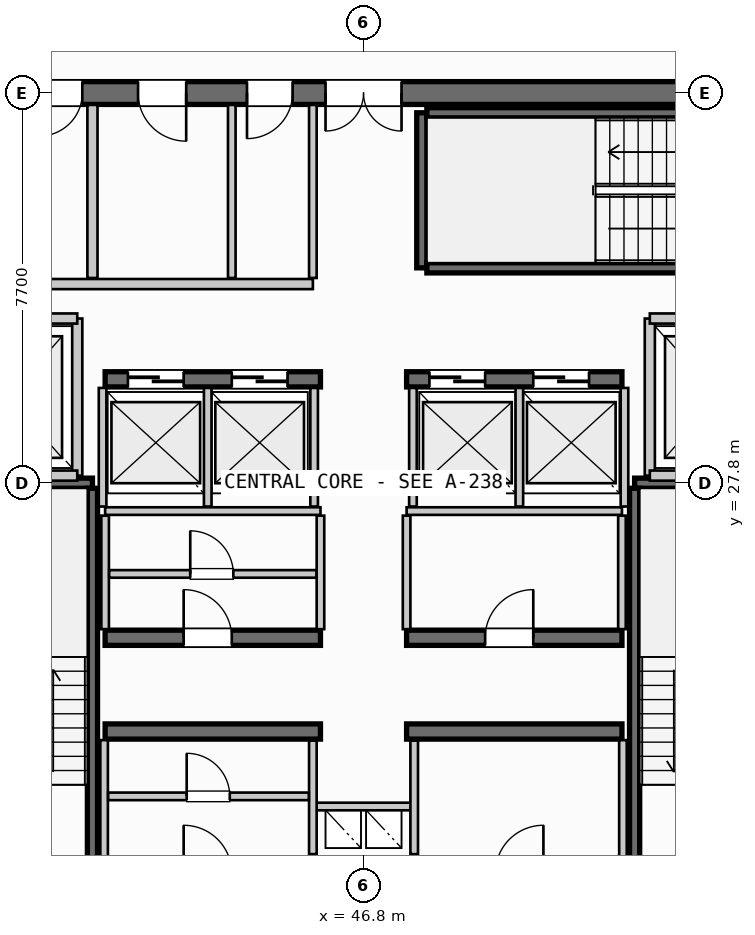
"""IFC4 building model, lengths in metres.
Left out: names, types, materials, properties, quantities, classifications, styles, units other than length and angle.
Written with IfcOpenShell. Run it as: python <this file> out.ifc"""

import sys

from ifc_helpers import new_model, si_unit, direction, frame, frame_2d, origin, place, context, subcontext, project, spatial, rectangle, extrude, source, transform, mapped, element, fill, save


model = new_model("IFC4")
c1 = context("Model", 3, precision=1e-05, world=origin(), true_north=direction((0.0, 1.0)))
c2 = subcontext(c1, "Body", "Model", "MODEL_VIEW")
j1 = project(units=[si_unit("LENGTHUNIT", "METRE"), si_unit("PLANEANGLEUNIT", "RADIAN")], contexts=[c1])
p1 = place(None, origin())
s1 = spatial("IfcSite", under=j1, at=p1, CompositionType="ELEMENT")
p2 = place(p1, origin())
s2 = spatial("IfcBuilding", under=s1, at=p2, CompositionType="ELEMENT")
p3 = place(p2, frame((0.0, 0.0, 276.7)))
s3 = spatial("IfcBuildingStorey", under=s2, at=p3, CompositionType="ELEMENT", Elevation=276.7)
p4 = place(p3, frame((55.6, 35.5, 0.0), z_axis=(0.0, 0.0, 1.0), x_axis=(-1.0, 0.0, 0.0)))
e1 = element("IfcWall", 1, at=p4, inside=s3, PredefinedType="SHEAR", context=c2, shape_type="SweptSolid", body=[
    extrude(rectangle(XDim=17.6, YDim=0.45, at=frame_2d((8.8, 0.0))), origin(), (0.0, 0.0, 1.0), 3.21),
])
p5 = place(p4, frame((8.05, 0.0, 0.0)))
e2 = element("IfcOpeningElement", 2, at=p5, cuts=e1, PredefinedType="OPENING", context=c2, shape_type="SweptSolid", body=[
    extrude(rectangle(XDim=1.5, YDim=2.2, at=frame_2d((0.75, 1.1))), frame((0.0, 0.235, 0.0), z_axis=(0.0, -1.0, 0.0), x_axis=(1.0, 0.0, 0.0)), (0.0, 0.0, 1.0), 0.47),
])
p6 = place(p4, frame((15.85, 0.0, 0.0)))
e3 = element("IfcOpeningElement", 3, at=p6, cuts=e1, PredefinedType="OPENING", context=c2, shape_type="SweptSolid", body=[
    extrude(rectangle(XDim=0.85, YDim=2.15, at=frame_2d((0.425, 1.075))), frame((0.0, 0.235, 0.0), z_axis=(0.0, -1.0, 0.0), x_axis=(1.0, 0.0, 0.0)), (0.0, 0.0, 1.0), 0.47),
])
p7 = place(p4, frame((14.35, 0.0, 0.0)))
e4 = element("IfcOpeningElement", 4, at=p7, cuts=e1, PredefinedType="OPENING", context=c2, shape_type="SweptSolid", body=[
    extrude(rectangle(XDim=0.85, YDim=2.15, at=frame_2d((0.425, 1.075))), frame((0.0, 0.235, 0.0), z_axis=(0.0, -1.0, 0.0), x_axis=(1.0, 0.0, 0.0)), (0.0, 0.0, 1.0), 0.47),
])
p8 = place(p4, frame((12.3, 0.0, 0.0)))
e5 = element("IfcOpeningElement", 5, at=p8, cuts=e1, PredefinedType="OPENING", context=c2, shape_type="SweptSolid", body=[
    extrude(rectangle(XDim=0.95, YDim=2.15, at=frame_2d((0.475, 1.075))), frame((0.0, 0.235, 0.0), z_axis=(0.0, -1.0, 0.0), x_axis=(1.0, 0.0, 0.0)), (0.0, 0.0, 1.0), 0.47),
])
p9 = place(p4, frame((10.2, 0.0, 0.0)))
e6 = element("IfcOpeningElement", 6, at=p9, cuts=e1, PredefinedType="OPENING", context=c2, shape_type="SweptSolid", body=[
    extrude(rectangle(XDim=0.9, YDim=2.15, at=frame_2d((0.45, 1.075))), frame((0.0, 0.235, 0.0), z_axis=(0.0, -1.0, 0.0), x_axis=(1.0, 0.0, 0.0)), (0.0, 0.0, 1.0), 0.47),
])
for number, where, z_axis, x_axis in (
    (7, (41.7, 22.9, 0.0), (0.0, 0.0, 1.0), (1.0, 0.0, 0.0)),
    (8, (47.65, 22.9, 0.0), (0.0, 0.0, 1.0), (1.0, 0.0, 0.0)),
):
    element("IfcWall", number, at=place(p3, frame(where, z_axis=z_axis, x_axis=x_axis)), inside=s3, PredefinedType="SHEAR", context=c2, shape_type="SweptSolid", body=[
        extrude(rectangle(XDim=4.25, YDim=0.3, at=frame_2d((2.125, 0.0))), origin(), (0.0, 0.0, 1.0), 3.21),
    ])
p10 = place(p3, frame((41.7, 24.75, 0.0), z_axis=(0.0, 0.0, 1.0), x_axis=(1.0, 0.0, 0.0)))
e9 = element("IfcWall", 9, at=p10, inside=s3, PredefinedType="SHEAR", context=c2, shape_type="SweptSolid", body=[
    extrude(rectangle(XDim=4.25, YDim=0.3, at=frame_2d((2.125, 0.0))), origin(), (0.0, 0.0, 1.0), 3.21),
])
p11 = place(p10, frame((1.55, 0.0, 0.0)))
e10 = element("IfcOpeningElement", 10, at=p11, cuts=e9, PredefinedType="OPENING", context=c2, shape_type="SweptSolid", body=[
    extrude(rectangle(XDim=0.95, YDim=2.15, at=frame_2d((0.475, 1.075))), frame((0.0, 0.16, 0.0), z_axis=(0.0, -1.0, 0.0), x_axis=(1.0, 0.0, 0.0)), (0.0, 0.0, 1.0), 0.32),
])
p12 = place(p3, frame((47.65, 24.75, 0.0), z_axis=(0.0, 0.0, 1.0), x_axis=(1.0, 0.0, 0.0)))
e11 = element("IfcWall", 11, at=p12, inside=s3, PredefinedType="SHEAR", context=c2, shape_type="SweptSolid", body=[
    extrude(rectangle(XDim=4.25, YDim=0.3, at=frame_2d((2.125, 0.0))), origin(), (0.0, 0.0, 1.0), 3.21),
])
p13 = place(p12, frame((1.55, 0.0, 0.0)))
e12 = element("IfcOpeningElement", 12, at=p13, cuts=e11, PredefinedType="OPENING", context=c2, shape_type="SweptSolid", body=[
    extrude(rectangle(XDim=0.95, YDim=2.15, at=frame_2d((0.475, 1.075))), frame((0.0, 0.16, 0.0), z_axis=(0.0, -1.0, 0.0), x_axis=(1.0, 0.0, 0.0)), (0.0, 0.0, 1.0), 0.32),
])
p14 = place(p3, frame((41.7, 29.85, 0.0), z_axis=(0.0, 0.0, 1.0), x_axis=(1.0, 0.0, 0.0)))
e13 = element("IfcWall", 13, at=p14, inside=s3, PredefinedType="SHEAR", context=c2, shape_type="SweptSolid", body=[
    extrude(rectangle(XDim=4.25, YDim=0.3, at=frame_2d((2.125, 0.0))), origin(), (0.0, 0.0, 1.0), 3.21),
])
p15 = place(p14, frame((0.45, 0.0, 0.0)))
e14 = element("IfcOpeningElement", 14, at=p15, cuts=e13, PredefinedType="OPENING", context=c2, shape_type="SweptSolid", body=[
    extrude(rectangle(XDim=1.1, YDim=2.2, at=frame_2d((0.55, 1.1))), frame((0.0, 0.16, 0.0), z_axis=(0.0, -1.0, 0.0), x_axis=(1.0, 0.0, 0.0)), (0.0, 0.0, 1.0), 0.32),
])
p16 = place(p14, frame((2.5, 0.0, 0.0)))
e15 = element("IfcOpeningElement", 15, at=p16, cuts=e13, PredefinedType="OPENING", context=c2, shape_type="SweptSolid", body=[
    extrude(rectangle(XDim=1.1, YDim=2.2, at=frame_2d((0.55, 1.1))), frame((0.0, 0.16, 0.0), z_axis=(0.0, -1.0, 0.0), x_axis=(1.0, 0.0, 0.0)), (0.0, 0.0, 1.0), 0.32),
])
p17 = place(p3, frame((47.65, 29.85, 0.0), z_axis=(0.0, 0.0, 1.0), x_axis=(1.0, 0.0, 0.0)))
e16 = element("IfcWall", 16, at=p17, inside=s3, PredefinedType="SHEAR", context=c2, shape_type="SweptSolid", body=[
    extrude(rectangle(XDim=4.25, YDim=0.3, at=frame_2d((2.125, 0.0))), origin(), (0.0, 0.0, 1.0), 3.21),
])
p18 = place(p17, frame((0.45, 0.0, 0.0)))
e17 = element("IfcOpeningElement", 17, at=p18, cuts=e16, PredefinedType="OPENING", context=c2, shape_type="SweptSolid", body=[
    extrude(rectangle(XDim=1.1, YDim=2.2, at=frame_2d((0.55, 1.1))), frame((0.0, 0.16, 0.0), z_axis=(0.0, -1.0, 0.0), x_axis=(1.0, 0.0, 0.0)), (0.0, 0.0, 1.0), 0.32),
])
p19 = place(p17, frame((2.5, 0.0, 0.0)))
e18 = element("IfcOpeningElement", 18, at=p19, cuts=e16, PredefinedType="OPENING", context=c2, shape_type="SweptSolid", body=[
    extrude(rectangle(XDim=1.1, YDim=2.2, at=frame_2d((0.55, 1.1))), frame((0.0, 0.16, 0.0), z_axis=(0.0, -1.0, 0.0), x_axis=(1.0, 0.0, 0.0)), (0.0, 0.0, 1.0), 0.32),
])
p20 = place(p3, frame((38.39, 27.8, 0.0), z_axis=(0.0, 0.0, 1.0), x_axis=(1.0, 0.0, 0.0)))
e19 = element("IfcWall", 19, at=p20, inside=s3, PredefinedType="SHEAR", context=c2, shape_type="SweptSolid", body=[
    extrude(rectangle(XDim=3.06, YDim=0.2, at=frame_2d((1.53, 0.0))), origin(), (0.0, 0.0, 1.0), 3.21),
])
p21 = place(p3, frame((41.45, 27.7, 0.0), z_axis=(0.0, 0.0, 1.0), x_axis=(0.0, -1.0, 0.0)))
e20 = element("IfcWall", 20, at=p21, inside=s3, PredefinedType="SHEAR", context=c2, shape_type="SweptSolid", body=[
    extrude(rectangle(XDim=7.35, YDim=0.2, at=frame_2d((3.675, 0.0))), origin(), (0.0, 0.0, 1.0), 3.21),
])
p22 = place(p3, frame((52.15, 27.8, 0.0), z_axis=(0.0, 0.0, 1.0), x_axis=(1.0, 0.0, 0.0)))
e21 = element("IfcWall", 21, at=p22, inside=s3, PredefinedType="SHEAR", context=c2, shape_type="SweptSolid", body=[
    extrude(rectangle(XDim=3.06, YDim=0.2, at=frame_2d((1.53, 0.0))), origin(), (0.0, 0.0, 1.0), 3.21),
])
p23 = place(p3, frame((52.15, 20.35, 0.0), z_axis=(0.0, 0.0, 1.0), x_axis=(0.0, 1.0, 0.0)))
e22 = element("IfcWall", 22, at=p23, inside=s3, PredefinedType="SHEAR", context=c2, shape_type="SweptSolid", body=[
    extrude(rectangle(XDim=7.35, YDim=0.2, at=frame_2d((3.675, 0.0))), origin(), (0.0, 0.0, 1.0), 3.21),
])
p24 = place(p3, frame((47.95, 32.05, 0.0), z_axis=(0.0, 0.0, 1.0), x_axis=(0.0, 1.0, 0.0)))
e23 = element("IfcWall", 23, at=p24, inside=s3, PredefinedType="SHEAR", context=c2, shape_type="SweptSolid", body=[
    extrude(rectangle(XDim=3.06, YDim=0.2, at=frame_2d((1.53, 0.0))), origin(), (0.0, 0.0, 1.0), 3.21),
])
for number, where, z_axis, x_axis in (
    (24, (48.05, 35.11, 0.0), (0.0, 0.0, 1.0), (1.0, 0.0, 0.0)),
    (25, (55.4, 32.05, 0.0), (0.0, 0.0, 1.0), (-1.0, 0.0, 0.0)),
):
    element("IfcWall", number, at=place(p3, frame(where, z_axis=z_axis, x_axis=x_axis)), inside=s3, PredefinedType="SHEAR", context=c2, shape_type="SweptSolid", body=[
        extrude(rectangle(XDim=7.35, YDim=0.2, at=frame_2d((3.675, 0.0))), origin(), (0.0, 0.0, 1.0), 3.21),
    ])
p25 = place(p3, frame((45.8, 21.42, 0.0), z_axis=(0.0, 0.0, 1.0), x_axis=(1.0, 0.0, 0.0)))
e26 = element("IfcWall", 26, at=p25, inside=s3, PredefinedType="PARTITIONING", context=c2, shape_type="SweptSolid", body=[
    extrude(rectangle(XDim=2.0, YDim=0.15, at=frame_2d((1.0, 0.0))), origin(), (0.0, 0.0, 1.0), 2.455),
])
for number, where, z_axis, x_axis in (
    (27, (45.8, 20.48, 0.0), (0.0, 0.0, 1.0), (0.0, 1.0, 0.0)),
    (28, (47.8, 20.48, 0.0), (0.0, 0.0, 1.0), (0.0, 1.0, 0.0)),
):
    element("IfcWall", number, at=place(p3, frame(where, z_axis=z_axis, x_axis=x_axis)), inside=s3, PredefinedType="PARTITIONING", context=c2, shape_type="SweptSolid", body=[
        extrude(rectangle(XDim=2.24, YDim=0.15, at=frame_2d((1.12, 0.0))), origin(), (0.0, 0.0, 1.0), 2.455),
    ])
p26 = place(p3, frame((41.15, 27.95, 0.0), z_axis=(0.0, 0.0, 1.0), x_axis=(0.0, 1.0, 0.0)))
e29 = element("IfcWall", 29, at=p26, inside=s3, PredefinedType="PARTITIONING", context=c2, shape_type="SweptSolid", body=[
    extrude(rectangle(XDim=3.1, YDim=0.2, at=frame_2d((1.55, 0.0))), origin(), (0.0, 0.0, 1.0), 2.455),
])
for number, where, z_axis, x_axis in (
    (30, (38.235, 27.95, 0.0), (0.0, 0.0, 1.0), (1.0, 0.0, 0.0)),
    (31, (38.235, 31.05, 0.0), (0.0, 0.0, 1.0), (1.0, 0.0, 0.0)),
):
    element("IfcWall", number, at=place(p3, frame(where, z_axis=z_axis, x_axis=x_axis)), inside=s3, PredefinedType="PARTITIONING", context=c2, shape_type="SweptSolid", body=[
        extrude(rectangle(XDim=2.915, YDim=0.2, at=frame_2d((1.458, 0.0))), origin(), (0.0, 0.0, 1.0), 2.455),
    ])
p27 = place(p3, frame((52.45, 27.95, 0.0), z_axis=(0.0, 0.0, 1.0), x_axis=(0.0, 1.0, 0.0)))
e32 = element("IfcWall", 32, at=p27, inside=s3, PredefinedType="PARTITIONING", context=c2, shape_type="SweptSolid", body=[
    extrude(rectangle(XDim=3.1, YDim=0.2, at=frame_2d((1.55, 0.0))), origin(), (0.0, 0.0, 1.0), 2.455),
])
for number, where, z_axis, x_axis in (
    (33, (52.45, 27.95, 0.0), (0.0, 0.0, 1.0), (1.0, 0.0, 0.0)),
    (34, (52.45, 31.05, 0.0), (0.0, 0.0, 1.0), (1.0, 0.0, 0.0)),
):
    element("IfcWall", number, at=place(p3, frame(where, z_axis=z_axis, x_axis=x_axis)), inside=s3, PredefinedType="PARTITIONING", context=c2, shape_type="SweptSolid", body=[
        extrude(rectangle(XDim=2.915, YDim=0.2, at=frame_2d((1.458, 0.0))), origin(), (0.0, 0.0, 1.0), 2.455),
    ])
for number, where, z_axis, x_axis in (
    (35, (41.68, 20.335, 0.0), (0.0, 0.0, 1.0), (0.0, 1.0, 0.0)),
    (36, (51.92, 20.335, 0.0), (0.0, 0.0, 1.0), (0.0, 1.0, 0.0)),
):
    element("IfcWall", number, at=place(p3, frame(where, z_axis=z_axis, x_axis=x_axis)), inside=s3, PredefinedType="PARTITIONING", context=c2, shape_type="SweptSolid", body=[
        extrude(rectangle(XDim=2.395, YDim=0.15, at=frame_2d((1.198, 0.0))), origin(), (0.0, 0.0, 1.0), 2.455),
    ])
p28 = place(p3, frame((41.76, 21.62, 0.0), z_axis=(0.0, 0.0, 1.0), x_axis=(1.0, 0.0, 0.0)))
e37 = element("IfcWall", 37, at=p28, inside=s3, PredefinedType="PARTITIONING", context=c2, shape_type="SweptSolid", body=[
    extrude(rectangle(XDim=3.96, YDim=0.15, at=frame_2d((1.98, 0.0))), origin(), (0.0, 0.0, 1.0), 2.455),
])
p29 = place(p28, frame((1.55, 0.0, 0.0)))
e38 = element("IfcOpeningElement", 38, at=p29, cuts=e37, PredefinedType="OPENING", context=c2, shape_type="SweptSolid", body=[
    extrude(rectangle(XDim=0.85, YDim=2.15, at=frame_2d((0.425, 1.075))), frame((0.0, 0.085, 0.0), z_axis=(0.0, -1.0, 0.0), x_axis=(1.0, 0.0, 0.0)), (0.0, 0.0, 1.0), 0.17),
])
for number, where, z_axis, x_axis in (
    (39, (41.7, 27.25, 0.0), (0.0, 0.0, 1.0), (1.0, 0.0, 0.0)),
    (40, (47.65, 27.25, 0.0), (0.0, 0.0, 1.0), (1.0, 0.0, 0.0)),
):
    element("IfcWall", number, at=place(p3, frame(where, z_axis=z_axis, x_axis=x_axis)), inside=s3, PredefinedType="PARTITIONING", context=c2, shape_type="SweptSolid", body=[
        extrude(rectangle(XDim=4.25, YDim=0.15, at=frame_2d((2.125, 0.0))), origin(), (0.0, 0.0, 1.0), 2.455),
    ])
for number, where, z_axis, x_axis in (
    (41, (41.7, 24.92, 0.0), (0.0, 0.0, 1.0), (0.0, 1.0, 0.0)),
    (42, (45.95, 24.92, 0.0), (0.0, 0.0, 1.0), (0.0, 1.0, 0.0)),
    (43, (47.65, 24.92, 0.0), (0.0, 0.0, 1.0), (0.0, 1.0, 0.0)),
    (44, (51.9, 24.92, 0.0), (0.0, 0.0, 1.0), (0.0, 1.0, 0.0)),
):
    element("IfcWall", number, at=place(p3, frame(where, z_axis=z_axis, x_axis=x_axis)), inside=s3, PredefinedType="PARTITIONING", context=c2, shape_type="SweptSolid", body=[
        extrude(rectangle(XDim=2.24, YDim=0.15, at=frame_2d((1.12, 0.0))), origin(), (0.0, 0.0, 1.0), 2.455),
    ])
p30 = place(p3, frame((41.78, 26.01, 0.0), z_axis=(0.0, 0.0, 1.0), x_axis=(1.0, 0.0, 0.0)))
e45 = element("IfcWall", 45, at=p30, inside=s3, PredefinedType="PARTITIONING", context=c2, shape_type="SweptSolid", body=[
    extrude(rectangle(XDim=4.09, YDim=0.15, at=frame_2d((2.045, 0.0))), origin(), (0.0, 0.0, 1.0), 2.455),
])
p31 = place(p30, frame((1.6, 0.0, 0.0)))
e46 = element("IfcOpeningElement", 46, at=p31, cuts=e45, PredefinedType="OPENING", context=c2, shape_type="SweptSolid", body=[
    extrude(rectangle(XDim=0.85, YDim=2.15, at=frame_2d((0.425, 1.075))), frame((0.0, 0.085, 0.0), z_axis=(0.0, -1.0, 0.0), x_axis=(1.0, 0.0, 0.0)), (0.0, 0.0, 1.0), 0.17),
])
for number, where, z_axis, x_axis in (
    (47, (41.65, 27.34, 0.0), (0.0, 0.0, 1.0), (0.0, 1.0, 0.0)),
    (48, (43.725, 27.34, 0.0), (0.0, 0.0, 1.0), (0.0, 1.0, 0.0)),
    (49, (45.825, 27.34, 0.0), (0.0, 0.0, 1.0), (0.0, 1.0, 0.0)),
    (50, (47.775, 27.34, 0.0), (0.0, 0.0, 1.0), (0.0, 1.0, 0.0)),
    (51, (49.875, 27.34, 0.0), (0.0, 0.0, 1.0), (0.0, 1.0, 0.0)),
    (52, (51.95, 27.34, 0.0), (0.0, 0.0, 1.0), (0.0, 1.0, 0.0)),
):
    element("IfcWall", number, at=place(p3, frame(where, z_axis=z_axis, x_axis=x_axis)), inside=s3, PredefinedType="PARTITIONING", context=c2, shape_type="SweptSolid", body=[
        extrude(rectangle(XDim=2.34, YDim=0.15, at=frame_2d((1.17, 0.0))), origin(), (0.0, 0.0, 1.0), 2.455),
    ])
p32 = place(p3, frame((41.45, 31.85, 0.0), z_axis=(0.0, 0.0, 1.0), x_axis=(0.0, 1.0, 0.0)))
e53 = element("IfcWall", 53, at=p32, inside=s3, PredefinedType="PARTITIONING", context=c2, shape_type="SweptSolid", body=[
    extrude(rectangle(XDim=3.415, YDim=0.2, at=frame_2d((1.708, 0.0))), origin(), (0.0, 0.0, 1.0), 2.455),
])
p33 = place(p3, frame((38.235, 31.73, 0.0), z_axis=(0.0, 0.0, 1.0), x_axis=(1.0, 0.0, 0.0)))
e54 = element("IfcWall", 54, at=p33, inside=s3, PredefinedType="PARTITIONING", context=c2, shape_type="SweptSolid", body=[
    extrude(rectangle(XDim=7.565, YDim=0.2, at=frame_2d((3.782, 0.0))), origin(), (0.0, 0.0, 1.0), 2.455),
])
p34 = place(p3, frame((45.8, 31.85, 0.0), z_axis=(0.0, 0.0, 1.0), x_axis=(0.0, 1.0, 0.0)))
e55 = element("IfcWall", 55, at=p34, inside=s3, PredefinedType="PARTITIONING", context=c2, shape_type="SweptSolid", body=[
    extrude(rectangle(XDim=3.415, YDim=0.15, at=frame_2d((1.708, 0.0))), origin(), (0.0, 0.0, 1.0), 2.455),
])
p35 = place(p3, frame((44.2, 31.85, 0.0), z_axis=(0.0, 0.0, 1.0), x_axis=(0.0, 1.0, 0.0)))
e56 = element("IfcWall", 56, at=p35, inside=s3, PredefinedType="PLUMBINGWALL", context=c2, shape_type="SweptSolid", body=[
    extrude(rectangle(XDim=3.415, YDim=0.15, at=frame_2d((1.708, 0.0))), origin(), (0.0, 0.0, 1.0), 2.455),
])
m1 = source(origin(), c2, "Body", "SweptSolid", [
    extrude(rectangle(XDim=1.5, YDim=2.2, at=frame_2d((0.75, 1.1))), frame((0.0, 0.025, 0.0), z_axis=(0.0, -1.0, 0.0), x_axis=(1.0, 0.0, 0.0)), (0.0, 0.0, 1.0), 0.05),
])
p36 = place(p5, origin())
e57 = element("IfcDoor", 57, at=p36, inside=s3, OperationType="DOUBLE_DOOR_SINGLE_SWING", PredefinedType="DOOR", context=c2, shape_type="MappedRepresentation", body=[
    mapped(m1, transform((0.0, 0.0, 0.0), scale=1.0)),
])
fill(e2, e57)
m2 = source(origin(), c2, "Body", "SweptSolid", [
    extrude(rectangle(XDim=0.95, YDim=2.15, at=frame_2d((0.475, 1.075))), frame((0.0, 0.025, 0.0), z_axis=(0.0, -1.0, 0.0), x_axis=(1.0, 0.0, 0.0)), (0.0, 0.0, 1.0), 0.05),
])
p37 = place(p11, origin())
e58 = element("IfcDoor", 58, at=p37, inside=s3, OperationType="SINGLE_SWING_LEFT", PredefinedType="DOOR", context=c2, shape_type="MappedRepresentation", body=[
    mapped(m2, transform((0.0, 0.0, 0.0), scale=1.0)),
])
fill(e10, e58)
p38 = place(p13, origin())
e59 = element("IfcDoor", 59, at=p38, inside=s3, OperationType="SINGLE_SWING_RIGHT", PredefinedType="DOOR", context=c2, shape_type="MappedRepresentation", body=[
    mapped(m2, transform((0.0, 0.0, 0.0), scale=1.0)),
])
fill(e12, e59)
m3 = source(origin(), c2, "Body", "SweptSolid", [
    extrude(rectangle(XDim=1.1, YDim=2.2, at=frame_2d((0.55, 1.1))), frame((0.0, 0.025, 0.0), z_axis=(0.0, -1.0, 0.0), x_axis=(1.0, 0.0, 0.0)), (0.0, 0.0, 1.0), 0.05),
])
p39 = place(p15, origin())
e60 = element("IfcDoor", 60, at=p39, inside=s3, OperationType="SLIDING_TO_LEFT", PredefinedType="DOOR", context=c2, shape_type="MappedRepresentation", body=[
    mapped(m3, transform((0.0, 0.0, 0.0), scale=1.0)),
])
fill(e14, e60)
p40 = place(p16, origin())
e61 = element("IfcDoor", 61, at=p40, inside=s3, OperationType="SLIDING_TO_LEFT", PredefinedType="DOOR", context=c2, shape_type="MappedRepresentation", body=[
    mapped(m3, transform((0.0, 0.0, 0.0), scale=1.0)),
])
fill(e15, e61)
p41 = place(p18, origin())
e62 = element("IfcDoor", 62, at=p41, inside=s3, OperationType="SLIDING_TO_LEFT", PredefinedType="DOOR", context=c2, shape_type="MappedRepresentation", body=[
    mapped(m3, transform((0.0, 0.0, 0.0), scale=1.0)),
])
fill(e17, e62)
p42 = place(p19, origin())
e63 = element("IfcDoor", 63, at=p42, inside=s3, OperationType="SLIDING_TO_LEFT", PredefinedType="DOOR", context=c2, shape_type="MappedRepresentation", body=[
    mapped(m3, transform((0.0, 0.0, 0.0), scale=1.0)),
])
fill(e18, e63)
m4 = source(origin(), c2, "Body", "SweptSolid", [
    extrude(rectangle(XDim=0.85, YDim=2.15, at=frame_2d((0.425, 1.075))), frame((0.0, 0.025, 0.0), z_axis=(0.0, -1.0, 0.0), x_axis=(1.0, 0.0, 0.0)), (0.0, 0.0, 1.0), 0.05),
])
p43 = place(p7, origin())
e64 = element("IfcDoor", 64, at=p43, inside=s3, OperationType="SINGLE_SWING_RIGHT", PredefinedType="DOOR", context=c2, shape_type="MappedRepresentation", body=[
    mapped(m4, transform((0.0, 0.0, 0.0), scale=1.0)),
])
fill(e4, e64)
p44 = place(p8, origin())
e65 = element("IfcDoor", 65, at=p44, inside=s3, OperationType="SINGLE_SWING_LEFT", PredefinedType="DOOR", context=c2, shape_type="MappedRepresentation", body=[
    mapped(m2, transform((0.0, 0.0, 0.0), scale=1.0)),
])
fill(e5, e65)
m5 = source(origin(), c2, "Body", "SweptSolid", [
    extrude(rectangle(XDim=0.9, YDim=2.15, at=frame_2d((0.45, 1.075))), frame((0.0, 0.025, 0.0), z_axis=(0.0, -1.0, 0.0), x_axis=(1.0, 0.0, 0.0)), (0.0, 0.0, 1.0), 0.05),
])
p45 = place(p9, origin())
e66 = element("IfcDoor", 66, at=p45, inside=s3, OperationType="SINGLE_SWING_RIGHT", PredefinedType="DOOR", context=c2, shape_type="MappedRepresentation", body=[
    mapped(m5, transform((0.0, 0.0, 0.0), scale=1.0)),
])
fill(e6, e66)
p46 = place(p29, origin())
e67 = element("IfcDoor", 67, at=p46, inside=s3, OperationType="SINGLE_SWING_LEFT", PredefinedType="DOOR", context=c2, shape_type="MappedRepresentation", body=[
    mapped(m4, transform((0.0, 0.0, 0.0), scale=1.0)),
])
fill(e38, e67)
p47 = place(p31, origin())
e68 = element("IfcDoor", 68, at=p47, inside=s3, OperationType="SINGLE_SWING_LEFT", PredefinedType="DOOR", context=c2, shape_type="MappedRepresentation", body=[
    mapped(m4, transform((0.0, 0.0, 0.0), scale=1.0)),
])
fill(e46, e68)
save(model, sys.argv[1])
